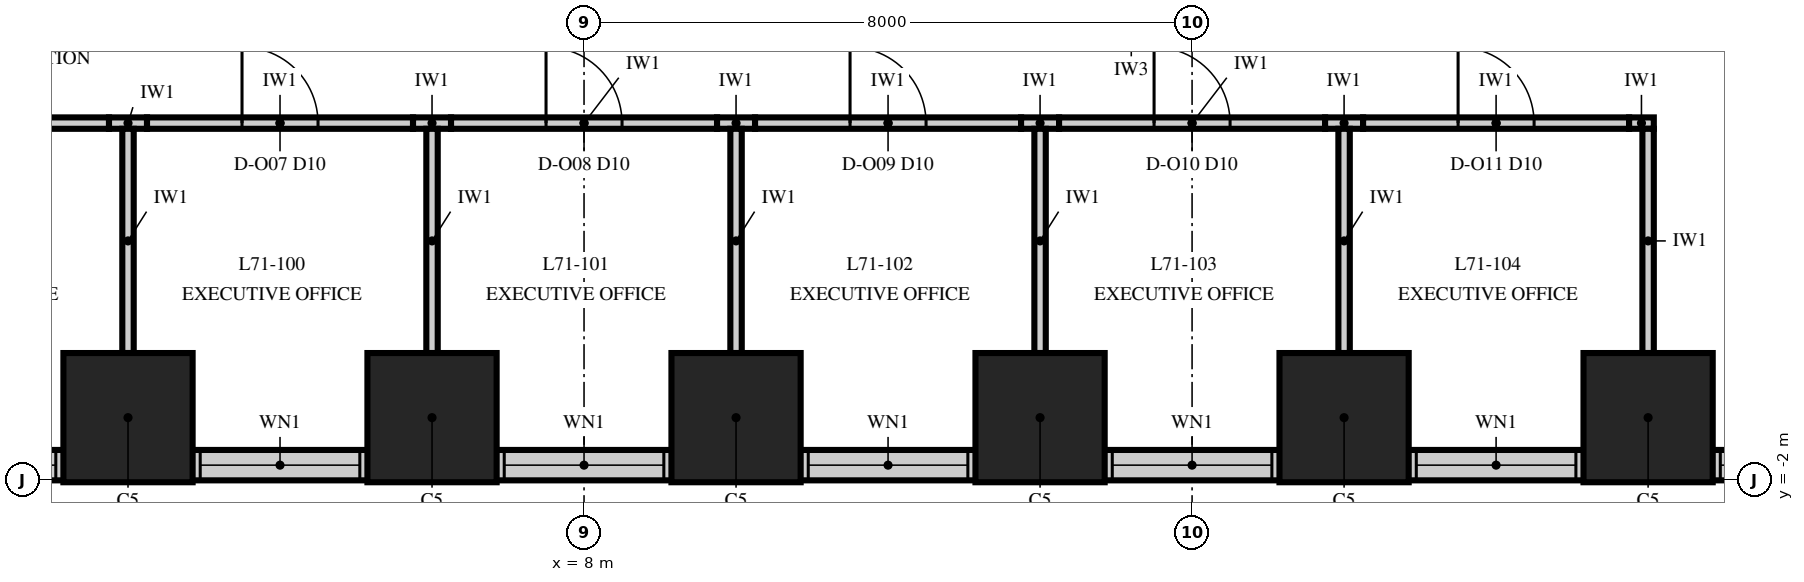
"""IFC4 building model, lengths in metres.
Left out: names, types, materials, properties, quantities, classifications, styles, units other than length and angle.
Written with IfcOpenShell. Run it as: python <this file> out.ifc"""

import sys

from ifc_helpers import new_model, si_unit, direction, frame, frame_2d, origin, origin_2d, place, context, subcontext, project, spatial, rectangle, extrude, element, fill, save


model = new_model("IFC4")
c1 = context("Model", 3, precision=1e-05, world=origin(), true_north=direction((0.0, 1.0)))
c2 = subcontext(c1, "Body", "Model", "MODEL_VIEW")
j1 = project(units=[si_unit("LENGTHUNIT", "METRE"), si_unit("PLANEANGLEUNIT", "RADIAN")], contexts=[c1])
p1 = place(None, origin())
s1 = spatial("IfcSite", under=j1, at=p1, CompositionType="ELEMENT")
p2 = place(p1, origin())
s2 = spatial("IfcBuilding", under=s1, at=p2, CompositionType="ELEMENT")
p3 = place(p2, frame((0.0, 0.0, 304.0)))
s3 = spatial("IfcBuildingStorey", under=s2, at=p3, CompositionType="ELEMENT", Elevation=304.0)
for number, where, z_axis, x_axis in (
    (1, (2.0, -1.175, 0.0), (0.0, 0.0, 1.0), (1.0, 0.0, 0.0)),
    (2, (6.0, -1.175, 0.0), (0.0, 0.0, 1.0), (1.0, 0.0, 0.0)),
    (3, (10.0, -1.175, 0.0), (0.0, 0.0, 1.0), (1.0, 0.0, 0.0)),
    (4, (14.0, -1.175, 0.0), (0.0, 0.0, 1.0), (1.0, 0.0, 0.0)),
    (5, (18.0, -1.175, 0.0), (0.0, 0.0, 1.0), (1.0, 0.0, 0.0)),
    (6, (22.0, -1.175, 0.0), (0.0, 0.0, 1.0), (1.0, 0.0, 0.0)),
):
    element("IfcColumn", number, at=place(p3, frame(where, z_axis=z_axis, x_axis=x_axis)), inside=s3, PredefinedType="COLUMN", context=c2, shape_type="SweptSolid", body=[
        extrude(rectangle(XDim=1.7, YDim=1.7, at=origin_2d()), origin(), (0.0, 0.0, 1.0), 3.75),
    ])
p4 = place(p3, frame((-26.0, -1.8, 0.0), z_axis=(0.0, 0.0, 1.0), x_axis=(1.0, 0.0, 0.0)))
e7 = element("IfcWall", 7, at=p4, inside=s3, PredefinedType="SOLIDWALL", context=c2, shape_type="SweptSolid", body=[
    extrude(rectangle(XDim=52.0, YDim=0.4, at=frame_2d((26.0, 0.0))), origin(), (0.0, 0.0, 1.0), 2.0),
])
p5 = place(p4, frame((0.95, 0.0, 0.8)))
e8 = element("IfcOpeningElement", 8, at=p5, cuts=e7, PredefinedType="OPENING", context=c2, shape_type="SweptSolid", body=[
    extrude(rectangle(XDim=2.1, YDim=1.15, at=frame_2d((1.05, 0.575))), frame((0.0, 0.215, 0.0), z_axis=(0.0, -1.0, 0.0), x_axis=(1.0, 0.0, 0.0)), (0.0, 0.0, 1.0), 0.43),
])
p6 = place(p4, frame((4.95, 0.0, 0.8)))
e9 = element("IfcOpeningElement", 9, at=p6, cuts=e7, PredefinedType="OPENING", context=c2, shape_type="SweptSolid", body=[
    extrude(rectangle(XDim=2.1, YDim=1.15, at=frame_2d((1.05, 0.575))), frame((0.0, 0.215, 0.0), z_axis=(0.0, -1.0, 0.0), x_axis=(1.0, 0.0, 0.0)), (0.0, 0.0, 1.0), 0.43),
])
p7 = place(p4, frame((8.95, 0.0, 0.8)))
e10 = element("IfcOpeningElement", 10, at=p7, cuts=e7, PredefinedType="OPENING", context=c2, shape_type="SweptSolid", body=[
    extrude(rectangle(XDim=2.1, YDim=1.15, at=frame_2d((1.05, 0.575))), frame((0.0, 0.215, 0.0), z_axis=(0.0, -1.0, 0.0), x_axis=(1.0, 0.0, 0.0)), (0.0, 0.0, 1.0), 0.43),
])
p8 = place(p4, frame((12.95, 0.0, 0.8)))
e11 = element("IfcOpeningElement", 11, at=p8, cuts=e7, PredefinedType="OPENING", context=c2, shape_type="SweptSolid", body=[
    extrude(rectangle(XDim=2.1, YDim=1.15, at=frame_2d((1.05, 0.575))), frame((0.0, 0.215, 0.0), z_axis=(0.0, -1.0, 0.0), x_axis=(1.0, 0.0, 0.0)), (0.0, 0.0, 1.0), 0.43),
])
p9 = place(p4, frame((16.95, 0.0, 0.8)))
e12 = element("IfcOpeningElement", 12, at=p9, cuts=e7, PredefinedType="OPENING", context=c2, shape_type="SweptSolid", body=[
    extrude(rectangle(XDim=2.1, YDim=1.15, at=frame_2d((1.05, 0.575))), frame((0.0, 0.215, 0.0), z_axis=(0.0, -1.0, 0.0), x_axis=(1.0, 0.0, 0.0)), (0.0, 0.0, 1.0), 0.43),
])
p10 = place(p4, frame((20.95, 0.0, 0.8)))
e13 = element("IfcOpeningElement", 13, at=p10, cuts=e7, PredefinedType="OPENING", context=c2, shape_type="SweptSolid", body=[
    extrude(rectangle(XDim=2.1, YDim=1.15, at=frame_2d((1.05, 0.575))), frame((0.0, 0.215, 0.0), z_axis=(0.0, -1.0, 0.0), x_axis=(1.0, 0.0, 0.0)), (0.0, 0.0, 1.0), 0.43),
])
p11 = place(p4, frame((24.95, 0.0, 0.8)))
e14 = element("IfcOpeningElement", 14, at=p11, cuts=e7, PredefinedType="OPENING", context=c2, shape_type="SweptSolid", body=[
    extrude(rectangle(XDim=2.1, YDim=1.15, at=frame_2d((1.05, 0.575))), frame((0.0, 0.215, 0.0), z_axis=(0.0, -1.0, 0.0), x_axis=(1.0, 0.0, 0.0)), (0.0, 0.0, 1.0), 0.43),
])
p12 = place(p4, frame((28.95, 0.0, 0.8)))
e15 = element("IfcOpeningElement", 15, at=p12, cuts=e7, PredefinedType="OPENING", context=c2, shape_type="SweptSolid", body=[
    extrude(rectangle(XDim=2.1, YDim=1.15, at=frame_2d((1.05, 0.575))), frame((0.0, 0.215, 0.0), z_axis=(0.0, -1.0, 0.0), x_axis=(1.0, 0.0, 0.0)), (0.0, 0.0, 1.0), 0.43),
])
p13 = place(p4, frame((32.95, 0.0, 0.8)))
e16 = element("IfcOpeningElement", 16, at=p13, cuts=e7, PredefinedType="OPENING", context=c2, shape_type="SweptSolid", body=[
    extrude(rectangle(XDim=2.1, YDim=1.15, at=frame_2d((1.05, 0.575))), frame((0.0, 0.215, 0.0), z_axis=(0.0, -1.0, 0.0), x_axis=(1.0, 0.0, 0.0)), (0.0, 0.0, 1.0), 0.43),
])
p14 = place(p4, frame((36.95, 0.0, 0.8)))
e17 = element("IfcOpeningElement", 17, at=p14, cuts=e7, PredefinedType="OPENING", context=c2, shape_type="SweptSolid", body=[
    extrude(rectangle(XDim=2.1, YDim=1.15, at=frame_2d((1.05, 0.575))), frame((0.0, 0.215, 0.0), z_axis=(0.0, -1.0, 0.0), x_axis=(1.0, 0.0, 0.0)), (0.0, 0.0, 1.0), 0.43),
])
p15 = place(p4, frame((40.95, 0.0, 0.8)))
e18 = element("IfcOpeningElement", 18, at=p15, cuts=e7, PredefinedType="OPENING", context=c2, shape_type="SweptSolid", body=[
    extrude(rectangle(XDim=2.1, YDim=1.15, at=frame_2d((1.05, 0.575))), frame((0.0, 0.215, 0.0), z_axis=(0.0, -1.0, 0.0), x_axis=(1.0, 0.0, 0.0)), (0.0, 0.0, 1.0), 0.43),
])
p16 = place(p4, frame((44.95, 0.0, 0.8)))
e19 = element("IfcOpeningElement", 19, at=p16, cuts=e7, PredefinedType="OPENING", context=c2, shape_type="SweptSolid", body=[
    extrude(rectangle(XDim=2.1, YDim=1.15, at=frame_2d((1.05, 0.575))), frame((0.0, 0.215, 0.0), z_axis=(0.0, -1.0, 0.0), x_axis=(1.0, 0.0, 0.0)), (0.0, 0.0, 1.0), 0.43),
])
p17 = place(p4, frame((48.95, 0.0, 0.8)))
e20 = element("IfcOpeningElement", 20, at=p17, cuts=e7, PredefinedType="OPENING", context=c2, shape_type="SweptSolid", body=[
    extrude(rectangle(XDim=2.1, YDim=1.15, at=frame_2d((1.05, 0.575))), frame((0.0, 0.215, 0.0), z_axis=(0.0, -1.0, 0.0), x_axis=(1.0, 0.0, 0.0)), (0.0, 0.0, 1.0), 0.43),
])
p18 = place(p3, frame((-1.75, 2.7, 0.0), z_axis=(0.0, 0.0, 1.0), x_axis=(1.0, 0.0, 0.0)))
e21 = element("IfcWall", 21, at=p18, inside=s3, PredefinedType="PARTITIONING", context=c2, shape_type="SweptSolid", body=[
    extrude(rectangle(XDim=3.5, YDim=0.15, at=frame_2d((1.75, 0.0))), origin(), (0.0, 0.0, 1.0), 3.85),
])
p19 = place(p18, frame((1.25, 0.0, 0.0)))
e22 = element("IfcOpeningElement", 22, at=p19, cuts=e21, PredefinedType="OPENING", context=c2, shape_type="SweptSolid", body=[
    extrude(rectangle(XDim=1.0, YDim=2.3, at=frame_2d((0.5, 1.15))), frame((0.0, 0.09, 0.0), z_axis=(0.0, -1.0, 0.0), x_axis=(1.0, 0.0, 0.0)), (0.0, 0.0, 1.0), 0.18),
])
p20 = place(p3, frame((1.75, 2.7, 0.0), z_axis=(0.0, 0.0, 1.0), x_axis=(1.0, 0.0, 0.0)))
e23 = element("IfcWall", 23, at=p20, inside=s3, PredefinedType="PARTITIONING", context=c2, shape_type="SweptSolid", body=[
    extrude(rectangle(XDim=0.5, YDim=0.15, at=frame_2d((0.25, 0.0))), origin(), (0.0, 0.0, 1.0), 2.15),
])
p21 = place(p3, frame((2.25, 2.7, 0.0), z_axis=(0.0, 0.0, 1.0), x_axis=(1.0, 0.0, 0.0)))
e24 = element("IfcWall", 24, at=p21, inside=s3, PredefinedType="PARTITIONING", context=c2, shape_type="SweptSolid", body=[
    extrude(rectangle(XDim=3.5, YDim=0.15, at=frame_2d((1.75, 0.0))), origin(), (0.0, 0.0, 1.0), 3.85),
])
p22 = place(p21, frame((1.25, 0.0, 0.0)))
e25 = element("IfcOpeningElement", 25, at=p22, cuts=e24, PredefinedType="OPENING", context=c2, shape_type="SweptSolid", body=[
    extrude(rectangle(XDim=1.0, YDim=2.3, at=frame_2d((0.5, 1.15))), frame((0.0, 0.09, 0.0), z_axis=(0.0, -1.0, 0.0), x_axis=(1.0, 0.0, 0.0)), (0.0, 0.0, 1.0), 0.18),
])
p23 = place(p3, frame((5.75, 2.7, 0.0), z_axis=(0.0, 0.0, 1.0), x_axis=(1.0, 0.0, 0.0)))
e26 = element("IfcWall", 26, at=p23, inside=s3, PredefinedType="PARTITIONING", context=c2, shape_type="SweptSolid", body=[
    extrude(rectangle(XDim=0.5, YDim=0.15, at=frame_2d((0.25, 0.0))), origin(), (0.0, 0.0, 1.0), 2.15),
])
p24 = place(p3, frame((6.25, 2.7, 0.0), z_axis=(0.0, 0.0, 1.0), x_axis=(1.0, 0.0, 0.0)))
e27 = element("IfcWall", 27, at=p24, inside=s3, PredefinedType="PARTITIONING", context=c2, shape_type="SweptSolid", body=[
    extrude(rectangle(XDim=3.5, YDim=0.15, at=frame_2d((1.75, 0.0))), origin(), (0.0, 0.0, 1.0), 3.85),
])
p25 = place(p24, frame((1.25, 0.0, 0.0)))
e28 = element("IfcOpeningElement", 28, at=p25, cuts=e27, PredefinedType="OPENING", context=c2, shape_type="SweptSolid", body=[
    extrude(rectangle(XDim=1.0, YDim=2.3, at=frame_2d((0.5, 1.15))), frame((0.0, 0.09, 0.0), z_axis=(0.0, -1.0, 0.0), x_axis=(1.0, 0.0, 0.0)), (0.0, 0.0, 1.0), 0.18),
])
p26 = place(p3, frame((9.75, 2.7, 0.0), z_axis=(0.0, 0.0, 1.0), x_axis=(1.0, 0.0, 0.0)))
e29 = element("IfcWall", 29, at=p26, inside=s3, PredefinedType="PARTITIONING", context=c2, shape_type="SweptSolid", body=[
    extrude(rectangle(XDim=0.5, YDim=0.15, at=frame_2d((0.25, 0.0))), origin(), (0.0, 0.0, 1.0), 2.15),
])
p27 = place(p3, frame((10.25, 2.7, 0.0), z_axis=(0.0, 0.0, 1.0), x_axis=(1.0, 0.0, 0.0)))
e30 = element("IfcWall", 30, at=p27, inside=s3, PredefinedType="PARTITIONING", context=c2, shape_type="SweptSolid", body=[
    extrude(rectangle(XDim=3.5, YDim=0.15, at=frame_2d((1.75, 0.0))), origin(), (0.0, 0.0, 1.0), 3.85),
])
p28 = place(p27, frame((1.25, 0.0, 0.0)))
e31 = element("IfcOpeningElement", 31, at=p28, cuts=e30, PredefinedType="OPENING", context=c2, shape_type="SweptSolid", body=[
    extrude(rectangle(XDim=1.0, YDim=2.3, at=frame_2d((0.5, 1.15))), frame((0.0, 0.09, 0.0), z_axis=(0.0, -1.0, 0.0), x_axis=(1.0, 0.0, 0.0)), (0.0, 0.0, 1.0), 0.18),
])
p29 = place(p3, frame((13.75, 2.7, 0.0), z_axis=(0.0, 0.0, 1.0), x_axis=(1.0, 0.0, 0.0)))
e32 = element("IfcWall", 32, at=p29, inside=s3, PredefinedType="PARTITIONING", context=c2, shape_type="SweptSolid", body=[
    extrude(rectangle(XDim=0.5, YDim=0.15, at=frame_2d((0.25, 0.0))), origin(), (0.0, 0.0, 1.0), 2.15),
])
p30 = place(p3, frame((14.25, 2.7, 0.0), z_axis=(0.0, 0.0, 1.0), x_axis=(1.0, 0.0, 0.0)))
e33 = element("IfcWall", 33, at=p30, inside=s3, PredefinedType="PARTITIONING", context=c2, shape_type="SweptSolid", body=[
    extrude(rectangle(XDim=3.5, YDim=0.15, at=frame_2d((1.75, 0.0))), origin(), (0.0, 0.0, 1.0), 3.85),
])
p31 = place(p30, frame((1.25, 0.0, 0.0)))
e34 = element("IfcOpeningElement", 34, at=p31, cuts=e33, PredefinedType="OPENING", context=c2, shape_type="SweptSolid", body=[
    extrude(rectangle(XDim=1.0, YDim=2.3, at=frame_2d((0.5, 1.15))), frame((0.0, 0.09, 0.0), z_axis=(0.0, -1.0, 0.0), x_axis=(1.0, 0.0, 0.0)), (0.0, 0.0, 1.0), 0.18),
])
p32 = place(p3, frame((17.75, 2.7, 0.0), z_axis=(0.0, 0.0, 1.0), x_axis=(1.0, 0.0, 0.0)))
e35 = element("IfcWall", 35, at=p32, inside=s3, PredefinedType="PARTITIONING", context=c2, shape_type="SweptSolid", body=[
    extrude(rectangle(XDim=0.5, YDim=0.15, at=frame_2d((0.25, 0.0))), origin(), (0.0, 0.0, 1.0), 2.15),
])
p33 = place(p3, frame((18.25, 2.7, 0.0), z_axis=(0.0, 0.0, 1.0), x_axis=(1.0, 0.0, 0.0)))
e36 = element("IfcWall", 36, at=p33, inside=s3, PredefinedType="PARTITIONING", context=c2, shape_type="SweptSolid", body=[
    extrude(rectangle(XDim=3.5, YDim=0.15, at=frame_2d((1.75, 0.0))), origin(), (0.0, 0.0, 1.0), 3.85),
])
p34 = place(p33, frame((1.25, 0.0, 0.0)))
e37 = element("IfcOpeningElement", 37, at=p34, cuts=e36, PredefinedType="OPENING", context=c2, shape_type="SweptSolid", body=[
    extrude(rectangle(XDim=1.0, YDim=2.3, at=frame_2d((0.5, 1.15))), frame((0.0, 0.09, 0.0), z_axis=(0.0, -1.0, 0.0), x_axis=(1.0, 0.0, 0.0)), (0.0, 0.0, 1.0), 0.18),
])
p35 = place(p3, frame((21.75, 2.7, 0.0), z_axis=(0.0, 0.0, 1.0), x_axis=(1.0, 0.0, 0.0)))
e38 = element("IfcWall", 38, at=p35, inside=s3, PredefinedType="PARTITIONING", context=c2, shape_type="SweptSolid", body=[
    extrude(rectangle(XDim=0.325, YDim=0.15, at=frame_2d((0.163, 0.0))), origin(), (0.0, 0.0, 1.0), 2.15),
])
for number, where, z_axis, x_axis in (
    (39, (2.0, -0.325, 0.0), (0.0, 0.0, 1.0), (0.0, 1.0, 0.0)),
    (40, (6.0, -0.325, 0.0), (0.0, 0.0, 1.0), (0.0, 1.0, 0.0)),
    (41, (10.0, -0.325, 0.0), (0.0, 0.0, 1.0), (0.0, 1.0, 0.0)),
    (42, (14.0, -0.325, 0.0), (0.0, 0.0, 1.0), (0.0, 1.0, 0.0)),
    (43, (18.0, -0.325, 0.0), (0.0, 0.0, 1.0), (0.0, 1.0, 0.0)),
    (44, (22.0, -0.325, 0.0), (0.0, 0.0, 1.0), (0.0, 1.0, 0.0)),
):
    element("IfcWall", number, at=place(p3, frame(where, z_axis=z_axis, x_axis=x_axis)), inside=s3, PredefinedType="PARTITIONING", context=c2, shape_type="SweptSolid", body=[
        extrude(rectangle(XDim=2.95, YDim=0.15, at=frame_2d((1.475, 0.0))), origin(), (0.0, 0.0, 1.0), 2.15),
    ])
p36 = place(p11, origin())
e45 = element("IfcWindow", 45, at=p36, inside=s3, PartitioningType="SINGLE_PANEL", PredefinedType="WINDOW", context=c2, shape_type="SweptSolid", body=[
    extrude(rectangle(XDim=2.1, YDim=1.15, at=frame_2d((1.05, 0.575))), frame((0.0, 0.03, 0.0), z_axis=(0.0, -1.0, 0.0), x_axis=(1.0, 0.0, 0.0)), (0.0, 0.0, 1.0), 0.06),
])
fill(e14, e45)
p37 = place(p12, origin())
e46 = element("IfcWindow", 46, at=p37, inside=s3, PartitioningType="SINGLE_PANEL", PredefinedType="WINDOW", context=c2, shape_type="SweptSolid", body=[
    extrude(rectangle(XDim=2.1, YDim=1.15, at=frame_2d((1.05, 0.575))), frame((0.0, 0.03, 0.0), z_axis=(0.0, -1.0, 0.0), x_axis=(1.0, 0.0, 0.0)), (0.0, 0.0, 1.0), 0.06),
])
fill(e15, e46)
p38 = place(p13, origin())
e47 = element("IfcWindow", 47, at=p38, inside=s3, PartitioningType="SINGLE_PANEL", PredefinedType="WINDOW", context=c2, shape_type="SweptSolid", body=[
    extrude(rectangle(XDim=2.1, YDim=1.15, at=frame_2d((1.05, 0.575))), frame((0.0, 0.03, 0.0), z_axis=(0.0, -1.0, 0.0), x_axis=(1.0, 0.0, 0.0)), (0.0, 0.0, 1.0), 0.06),
])
fill(e16, e47)
p39 = place(p14, origin())
e48 = element("IfcWindow", 48, at=p39, inside=s3, PartitioningType="SINGLE_PANEL", PredefinedType="WINDOW", context=c2, shape_type="SweptSolid", body=[
    extrude(rectangle(XDim=2.1, YDim=1.15, at=frame_2d((1.05, 0.575))), frame((0.0, 0.03, 0.0), z_axis=(0.0, -1.0, 0.0), x_axis=(1.0, 0.0, 0.0)), (0.0, 0.0, 1.0), 0.06),
])
fill(e17, e48)
p40 = place(p15, origin())
e49 = element("IfcWindow", 49, at=p40, inside=s3, PartitioningType="SINGLE_PANEL", PredefinedType="WINDOW", context=c2, shape_type="SweptSolid", body=[
    extrude(rectangle(XDim=2.1, YDim=1.15, at=frame_2d((1.05, 0.575))), frame((0.0, 0.03, 0.0), z_axis=(0.0, -1.0, 0.0), x_axis=(1.0, 0.0, 0.0)), (0.0, 0.0, 1.0), 0.06),
])
fill(e18, e49)
p41 = place(p16, origin())
e50 = element("IfcWindow", 50, at=p41, inside=s3, PartitioningType="SINGLE_PANEL", PredefinedType="WINDOW", context=c2, shape_type="SweptSolid", body=[
    extrude(rectangle(XDim=2.1, YDim=1.15, at=frame_2d((1.05, 0.575))), frame((0.0, 0.03, 0.0), z_axis=(0.0, -1.0, 0.0), x_axis=(1.0, 0.0, 0.0)), (0.0, 0.0, 1.0), 0.06),
])
fill(e19, e50)
p42 = place(p17, origin())
e51 = element("IfcWindow", 51, at=p42, inside=s3, PartitioningType="SINGLE_PANEL", PredefinedType="WINDOW", context=c2, shape_type="SweptSolid", body=[
    extrude(rectangle(XDim=2.1, YDim=1.15, at=frame_2d((1.05, 0.575))), frame((0.0, 0.03, 0.0), z_axis=(0.0, -1.0, 0.0), x_axis=(1.0, 0.0, 0.0)), (0.0, 0.0, 1.0), 0.06),
])
fill(e20, e51)
p43 = place(p22, origin())
e52 = element("IfcDoor", 52, at=p43, inside=s3, OperationType="SINGLE_SWING_LEFT", PredefinedType="DOOR", context=c2, shape_type="SweptSolid", body=[
    extrude(rectangle(XDim=1.0, YDim=2.3, at=frame_2d((0.5, 1.15))), frame((0.0, 0.075, 0.0), z_axis=(0.0, -1.0, 0.0), x_axis=(1.0, 0.0, 0.0)), (0.0, 0.0, 1.0), 0.149),
])
fill(e25, e52)
p44 = place(p25, origin())
e53 = element("IfcDoor", 53, at=p44, inside=s3, OperationType="SINGLE_SWING_LEFT", PredefinedType="DOOR", context=c2, shape_type="SweptSolid", body=[
    extrude(rectangle(XDim=1.0, YDim=2.3, at=frame_2d((0.5, 1.15))), frame((0.0, 0.075, 0.0), z_axis=(0.0, -1.0, 0.0), x_axis=(1.0, 0.0, 0.0)), (0.0, 0.0, 1.0), 0.149),
])
fill(e28, e53)
p45 = place(p28, origin())
e54 = element("IfcDoor", 54, at=p45, inside=s3, OperationType="SINGLE_SWING_LEFT", PredefinedType="DOOR", context=c2, shape_type="SweptSolid", body=[
    extrude(rectangle(XDim=1.0, YDim=2.3, at=frame_2d((0.5, 1.15))), frame((0.0, 0.075, 0.0), z_axis=(0.0, -1.0, 0.0), x_axis=(1.0, 0.0, 0.0)), (0.0, 0.0, 1.0), 0.149),
])
fill(e31, e54)
p46 = place(p31, origin())
e55 = element("IfcDoor", 55, at=p46, inside=s3, OperationType="SINGLE_SWING_LEFT", PredefinedType="DOOR", context=c2, shape_type="SweptSolid", body=[
    extrude(rectangle(XDim=1.0, YDim=2.3, at=frame_2d((0.5, 1.15))), frame((0.0, 0.075, 0.0), z_axis=(0.0, -1.0, 0.0), x_axis=(1.0, 0.0, 0.0)), (0.0, 0.0, 1.0), 0.149),
])
fill(e34, e55)
p47 = place(p34, origin())
e56 = element("IfcDoor", 56, at=p47, inside=s3, OperationType="SINGLE_SWING_LEFT", PredefinedType="DOOR", context=c2, shape_type="SweptSolid", body=[
    extrude(rectangle(XDim=1.0, YDim=2.3, at=frame_2d((0.5, 1.15))), frame((0.0, 0.075, 0.0), z_axis=(0.0, -1.0, 0.0), x_axis=(1.0, 0.0, 0.0)), (0.0, 0.0, 1.0), 0.149),
])
fill(e37, e56)
save(model, sys.argv[1])
